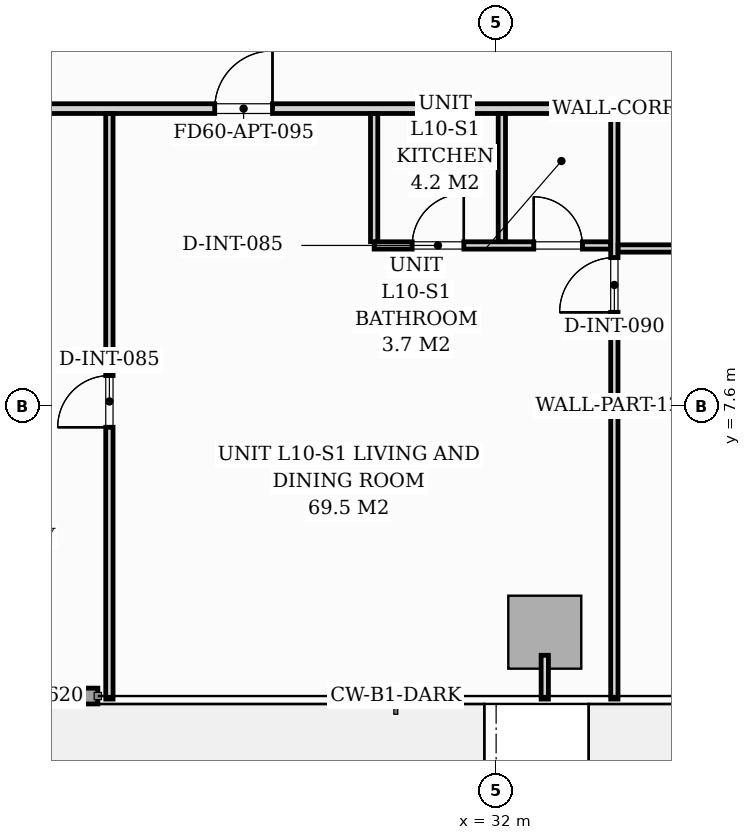
"""IFC4 building model, lengths in metres.
Left out: names, types, materials, properties, quantities, classifications, styles, units other than length and angle.
Written with IfcOpenShell. Run it as: python <this file> out.ifc"""

import sys

from ifc_helpers import new_model, si_unit, direction, frame, frame_2d, origin, origin_2d, place, context, subcontext, project, spatial, rectangle, extrude, source, transform, mapped, element, fill, save


model = new_model("IFC4")
c1 = context("Model", 3, precision=1e-05, world=origin(), true_north=direction((0.0, 1.0)))
c2 = subcontext(c1, "Body", "Model", "MODEL_VIEW")
j1 = project(units=[si_unit("LENGTHUNIT", "METRE"), si_unit("PLANEANGLEUNIT", "RADIAN")], contexts=[c1])
p1 = place(None, origin())
s1 = spatial("IfcSite", under=j1, at=p1, CompositionType="ELEMENT")
p2 = place(p1, origin())
s2 = spatial("IfcBuilding", under=s1, at=p2, CompositionType="ELEMENT")
p3 = place(p2, frame((0.0, 0.0, 39.0)))
s3 = spatial("IfcBuildingStorey", under=s2, at=p3, CompositionType="ELEMENT", Elevation=39.0)
m1 = source(origin(), c2, "Body", "SweptSolid", [
    extrude(rectangle(XDim=1.2, YDim=1.2, at=origin_2d()), origin(), (0.0, 0.0, 1.0), 3.196),
])
p4 = place(p3, frame((32.8, 3.88, 0.002), z_axis=(0.0, 0.0, 1.0), x_axis=(1.0, 0.0, 0.0)))
e1 = element("IfcColumn", 1, at=p4, inside=s3, PredefinedType="COLUMN", context=c2, shape_type="MappedRepresentation", body=[
    mapped(m1, transform((0.0, 0.0, 0.0), scale=1.0)),
])
p5 = place(p3, frame((25.45, 2.83, 0.0), z_axis=(0.0, 0.0, 1.0), x_axis=(-1.0, 0.0, 0.0)))
e2 = element("IfcWall", 2, at=p5, inside=s3, PredefinedType="STANDARD", context=c2, shape_type="SweptSolid", body=[
    extrude(rectangle(XDim=17.15, YDim=0.26, at=frame_2d((8.575, 0.0))), origin(), (0.0, 0.0, 1.0), 2.94),
])
p6 = place(p5, frame((6.65, 0.0, 0.0)))
e3 = element("IfcOpeningElement", 3, at=p6, cuts=e2, PredefinedType="OPENING", context=c2, shape_type="SweptSolid", body=[
    extrude(rectangle(XDim=1.8, YDim=2.06, at=frame_2d((0.9, 1.03))), frame((0.0, 0.14, 0.0), z_axis=(0.0, -1.0, 0.0), x_axis=(1.0, 0.0, 0.0)), (0.0, 0.0, 1.0), 0.28),
])
p7 = place(p5, frame((0.7, 0.0, 0.65)))
e4 = element("IfcOpeningElement", 4, at=p7, cuts=e2, PredefinedType="OPENING", context=c2, shape_type="SweptSolid", body=[
    extrude(rectangle(XDim=1.6, YDim=1.5, at=frame_2d((0.8, 0.75))), frame((0.0, 0.14, 0.0), z_axis=(0.0, -1.0, 0.0), x_axis=(1.0, 0.0, 0.0)), (0.0, 0.0, 1.0), 0.28),
])
p8 = place(p3, frame((16.3, 12.49, 0.0), z_axis=(0.0, 0.0, 1.0), x_axis=(1.0, 0.0, 0.0)))
e5 = element("IfcWall", 5, at=p8, inside=s3, PredefinedType="PARTITIONING", context=c2, shape_type="SweptSolid", body=[
    extrude(rectangle(XDim=35.2, YDim=0.16, at=frame_2d((17.6, 0.0))), origin(), (0.0, 0.0, 1.0), 2.94),
])
p9 = place(p8, frame((11.072, 0.0, 0.0)))
e6 = element("IfcOpeningElement", 6, at=p9, cuts=e5, PredefinedType="OPENING", context=c2, shape_type="SweptSolid", body=[
    extrude(rectangle(XDim=0.95, YDim=2.06, at=frame_2d((0.475, 1.03))), frame((0.0, 0.09, 0.0), z_axis=(0.0, -1.0, 0.0), x_axis=(1.0, 0.0, 0.0)), (0.0, 0.0, 1.0), 0.18),
])
p10 = place(p8, frame((24.032, 0.0, 0.0)))
e7 = element("IfcOpeningElement", 7, at=p10, cuts=e5, PredefinedType="OPENING", context=c2, shape_type="SweptSolid", body=[
    extrude(rectangle(XDim=0.95, YDim=2.06, at=frame_2d((0.475, 1.03))), frame((0.0, 0.09, 0.0), z_axis=(0.0, -1.0, 0.0), x_axis=(1.0, 0.0, 0.0)), (0.0, 0.0, 1.0), 0.18),
])
p11 = place(p3, frame((33.944, 2.78, 0.0), z_axis=(0.0, 0.0, 1.0), x_axis=(0.0, 1.0, 0.0)))
e8 = element("IfcWall", 8, at=p11, inside=s3, PredefinedType="PARTITIONING", context=c2, shape_type="SweptSolid", body=[
    extrude(rectangle(XDim=9.628, YDim=0.12, at=frame_2d((4.814, 0.0))), origin(), (0.0, 0.0, 1.0), 2.94),
])
p12 = place(p11, frame((6.36, 0.0, 0.0)))
e9 = element("IfcOpeningElement", 9, at=p12, cuts=e8, PredefinedType="OPENING", context=c2, shape_type="SweptSolid", body=[
    extrude(rectangle(XDim=0.9, YDim=2.05, at=frame_2d((0.45, 1.025))), frame((0.0, 0.07, 0.0), z_axis=(0.0, -1.0, 0.0), x_axis=(1.0, 0.0, 0.0)), (0.0, 0.0, 1.0), 0.14),
])
p13 = place(p3, frame((29.994, 10.24, 0.0), z_axis=(0.0, 0.0, 1.0), x_axis=(1.0, 0.0, 0.0)))
e10 = element("IfcWall", 10, at=p13, inside=s3, PredefinedType="PARTITIONING", context=c2, shape_type="SweptSolid", body=[
    extrude(rectangle(XDim=3.888, YDim=0.12, at=frame_2d((1.944, 0.0))), origin(), (0.0, 0.0, 1.0), 2.94),
])
p14 = place(p13, frame((0.625, 0.0, 0.0)))
e11 = element("IfcOpeningElement", 11, at=p14, cuts=e10, PredefinedType="OPENING", context=c2, shape_type="SweptSolid", body=[
    extrude(rectangle(XDim=0.85, YDim=2.05, at=frame_2d((0.425, 1.025))), frame((0.0, 0.07, 0.0), z_axis=(0.0, -1.0, 0.0), x_axis=(1.0, 0.0, 0.0)), (0.0, 0.0, 1.0), 0.14),
])
p15 = place(p13, frame((2.625, 0.0, 0.0)))
e12 = element("IfcOpeningElement", 12, at=p15, cuts=e10, PredefinedType="OPENING", context=c2, shape_type="SweptSolid", body=[
    extrude(rectangle(XDim=0.8, YDim=2.02, at=frame_2d((0.4, 1.01))), frame((0.0, 0.07, 0.0), z_axis=(0.0, -1.0, 0.0), x_axis=(1.0, 0.0, 0.0)), (0.0, 0.0, 1.0), 0.14),
])
for number, where, z_axis, x_axis in (
    (13, (32.094, 10.302, 0.0), (0.0, 0.0, 1.0), (0.0, 1.0, 0.0)),
    (14, (29.994, 10.302, 0.0), (0.0, 0.0, 1.0), (0.0, 1.0, 0.0)),
):
    element("IfcWall", number, at=place(p3, frame(where, z_axis=z_axis, x_axis=x_axis)), inside=s3, PredefinedType="PARTITIONING", context=c2, shape_type="SweptSolid", body=[
        extrude(rectangle(XDim=2.106, YDim=0.12, at=frame_2d((1.053, 0.0))), origin(), (0.0, 0.0, 1.0), 2.94),
    ])
p16 = place(p3, frame((34.006, 10.19, 0.0), z_axis=(0.0, 0.0, 1.0), x_axis=(1.0, 0.0, 0.0)))
e15 = element("IfcWall", 15, at=p16, inside=s3, PredefinedType="PARTITIONING", context=c2, shape_type="SweptSolid", body=[
    extrude(rectangle(XDim=3.788, YDim=0.12, at=frame_2d((1.894, 0.0))), origin(), (0.0, 0.0, 1.0), 2.94),
])
p17 = place(p16, frame((1.413, 0.0, 0.0)))
e16 = element("IfcOpeningElement", 16, at=p17, cuts=e15, PredefinedType="OPENING", context=c2, shape_type="SweptSolid", body=[
    extrude(rectangle(XDim=0.8, YDim=2.02, at=frame_2d((0.4, 1.01))), frame((0.0, 0.07, 0.0), z_axis=(0.0, -1.0, 0.0), x_axis=(1.0, 0.0, 0.0)), (0.0, 0.0, 1.0), 0.14),
])
p18 = place(p3, frame((25.64, 2.78, 0.0), z_axis=(0.0, 0.0, 1.0), x_axis=(0.0, 1.0, 0.0)))
e17 = element("IfcWall", 17, at=p18, inside=s3, PredefinedType="PARTITIONING", context=c2, shape_type="SweptSolid", body=[
    extrude(rectangle(XDim=9.628, YDim=0.12, at=frame_2d((4.814, 0.0))), origin(), (0.0, 0.0, 1.0), 2.94),
])
p19 = place(p18, frame((4.47, 0.0, 0.0)))
e18 = element("IfcOpeningElement", 18, at=p19, cuts=e17, PredefinedType="OPENING", context=c2, shape_type="SweptSolid", body=[
    extrude(rectangle(XDim=0.85, YDim=2.05, at=frame_2d((0.425, 1.025))), frame((0.0, 0.07, 0.0), z_axis=(0.0, -1.0, 0.0), x_axis=(1.0, 0.0, 0.0)), (0.0, 0.0, 1.0), 0.14),
])
p20 = place(p3, frame((32.8, 3.5, 0.0), z_axis=(0.0, 0.0, 1.0), x_axis=(0.0, -1.0, 0.0)))
e19 = element("IfcWall", 19, at=p20, inside=s3, PredefinedType="PARTITIONING", context=c2, shape_type="SweptSolid", body=[
    extrude(rectangle(XDim=0.72, YDim=0.12, at=frame_2d((0.36, 0.0))), origin(), (0.0, 0.0, 1.0), 2.94),
])
m2 = source(origin(), c2, "Body", "SweptSolid", [
    extrude(rectangle(XDim=1.6, YDim=1.5, at=frame_2d((0.8, 0.75))), frame((0.0, 0.03, 0.0), z_axis=(0.0, -1.0, 0.0), x_axis=(1.0, 0.0, 0.0)), (0.0, 0.0, 1.0), 0.06),
])
p21 = place(p7, origin())
e20 = element("IfcWindow", 20, at=p21, inside=s3, PartitioningType="SINGLE_PANEL", PredefinedType="WINDOW", context=c2, shape_type="MappedRepresentation", body=[
    mapped(m2, transform((0.0, 0.0, 0.0), scale=1.0)),
])
fill(e4, e20)
m3 = source(origin(), c2, "Body", "SweptSolid", [
    extrude(rectangle(XDim=0.85, YDim=2.05, at=frame_2d((0.425, 1.025))), frame((0.0, 0.025, 0.0), z_axis=(0.0, -1.0, 0.0), x_axis=(1.0, 0.0, 0.0)), (0.0, 0.0, 1.0), 0.05),
])
p22 = place(p19, origin())
e21 = element("IfcDoor", 21, at=p22, inside=s3, OperationType="SINGLE_SWING_LEFT", PredefinedType="DOOR", context=c2, shape_type="MappedRepresentation", body=[
    mapped(m3, transform((0.0, 0.0, 0.0), scale=1.0)),
])
fill(e18, e21)
m4 = source(origin(), c2, "Body", "SweptSolid", [
    extrude(rectangle(XDim=0.95, YDim=2.06, at=frame_2d((0.475, 1.03))), frame((0.0, 0.025, 0.0), z_axis=(0.0, -1.0, 0.0), x_axis=(1.0, 0.0, 0.0)), (0.0, 0.0, 1.0), 0.05),
])
p23 = place(p9, origin())
e22 = element("IfcDoor", 22, at=p23, inside=s3, OperationType="SINGLE_SWING_RIGHT", PredefinedType="DOOR", context=c2, shape_type="MappedRepresentation", body=[
    mapped(m4, transform((0.0, 0.0, 0.0), scale=1.0)),
])
fill(e6, e22)
m5 = source(origin(), c2, "Body", "SweptSolid", [
    extrude(rectangle(XDim=0.9, YDim=2.05, at=frame_2d((0.45, 1.025))), frame((0.0, 0.025, 0.0), z_axis=(0.0, -1.0, 0.0), x_axis=(1.0, 0.0, 0.0)), (0.0, 0.0, 1.0), 0.05),
])
p24 = place(p12, origin())
e23 = element("IfcDoor", 23, at=p24, inside=s3, OperationType="SINGLE_SWING_LEFT", PredefinedType="DOOR", context=c2, shape_type="MappedRepresentation", body=[
    mapped(m5, transform((0.0, 0.0, 0.0), scale=1.0)),
])
fill(e9, e23)
p25 = place(p14, origin())
e24 = element("IfcDoor", 24, at=p25, inside=s3, OperationType="SINGLE_SWING_RIGHT", PredefinedType="DOOR", context=c2, shape_type="MappedRepresentation", body=[
    mapped(m3, transform((0.0, 0.0, 0.0), scale=1.0)),
])
fill(e11, e24)
m6 = source(origin(), c2, "Body", "SweptSolid", [
    extrude(rectangle(XDim=0.8, YDim=2.02, at=frame_2d((0.4, 1.01))), frame((0.0, 0.025, 0.0), z_axis=(0.0, -1.0, 0.0), x_axis=(1.0, 0.0, 0.0)), (0.0, 0.0, 1.0), 0.05),
])
p26 = place(p15, origin())
e25 = element("IfcDoor", 25, at=p26, inside=s3, OperationType="SINGLE_SWING_LEFT", PredefinedType="DOOR", context=c2, shape_type="MappedRepresentation", body=[
    mapped(m6, transform((0.0, 0.0, 0.0), scale=1.0)),
])
fill(e12, e25)
save(model, sys.argv[1])
